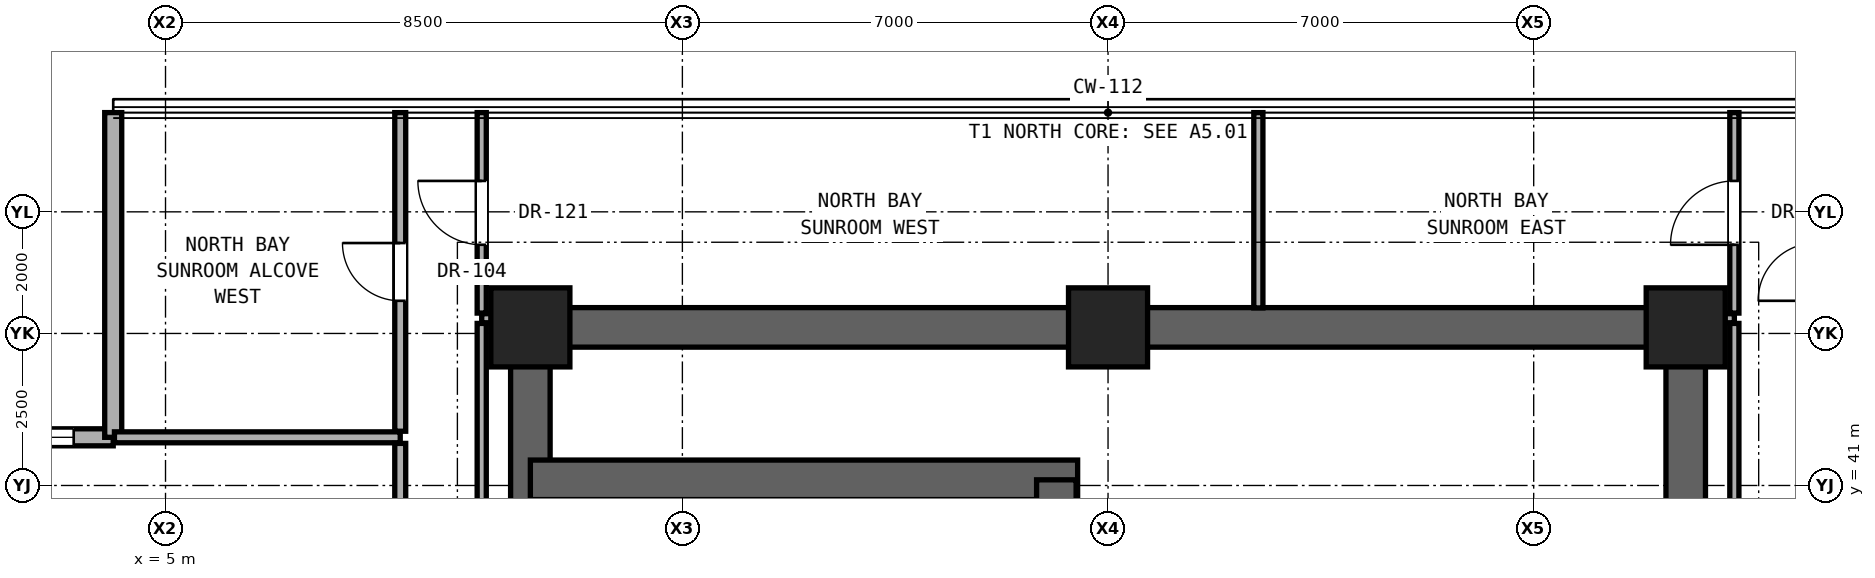
"""IFC4 building model, lengths in metres.
Left out: names, types, materials, properties, quantities, classifications, styles, units other than length and angle.
Written with IfcOpenShell. Run it as: python <this file> out.ifc"""

import sys

from ifc_helpers import new_model, si_unit, direction, frame, frame_2d, origin, origin_2d, place, context, subcontext, project, spatial, rectangle, extrude, element, fill, save


model = new_model("IFC4")
c1 = context("Model", 3, precision=1e-05, world=origin(), true_north=direction((0.0, 1.0)))
c2 = subcontext(c1, "Body", "Model", "MODEL_VIEW")
j1 = project(units=[si_unit("LENGTHUNIT", "METRE"), si_unit("PLANEANGLEUNIT", "RADIAN")], contexts=[c1])
p1 = place(None, origin())
s1 = spatial("IfcSite", under=j1, at=p1, CompositionType="ELEMENT")
p2 = place(p1, origin())
s2 = spatial("IfcBuilding", under=s1, at=p2, CompositionType="ELEMENT")
p3 = place(p2, frame((0.0, 0.0, 65.3)))
s3 = spatial("IfcBuildingStorey", under=s2, at=p3, CompositionType="ELEMENT", Elevation=65.3)
for number, where, z_axis, x_axis in (
    (1, (11.0, 43.6, 0.0), (0.0, 0.0, 1.0), (1.0, 0.0, 0.0)),
    (2, (20.5, 43.6, 0.0), (0.0, 0.0, 1.0), (1.0, 0.0, 0.0)),
    (3, (30.0, 43.6, 0.0), (0.0, 0.0, 1.0), (1.0, 0.0, 0.0)),
):
    element("IfcColumn", number, at=place(p3, frame(where, z_axis=z_axis, x_axis=x_axis)), inside=s3, PredefinedType="COLUMN", context=c2, shape_type="SweptSolid", body=[
        extrude(rectangle(XDim=1.3, YDim=1.3, at=origin_2d()), origin(), (0.0, 0.0, 1.0), 3.3),
    ])
p4 = place(p3, frame((11.0, 43.6, 0.0), z_axis=(0.0, 0.0, 1.0), x_axis=(1.0, 0.0, 0.0)))
e4 = element("IfcWall", 4, at=p4, inside=s3, PredefinedType="SHEAR", context=c2, shape_type="SweptSolid", body=[
    extrude(rectangle(XDim=19.0, YDim=0.65, at=frame_2d((9.5, 0.0))), origin(), (0.0, 0.0, 1.0), 3.06),
])
for number, where, z_axis, x_axis in (
    (5, (11.0, 37.6, 0.0), (0.0, 0.0, 1.0), (0.0, 1.0, 0.0)),
    (6, (30.0, 37.6, 0.0), (0.0, 0.0, 1.0), (0.0, 1.0, 0.0)),
):
    element("IfcWall", number, at=place(p3, frame(where, z_axis=z_axis, x_axis=x_axis)), inside=s3, PredefinedType="SHEAR", context=c2, shape_type="SweptSolid", body=[
        extrude(rectangle(XDim=6.0, YDim=0.65, at=frame_2d((3.0, 0.0))), origin(), (0.0, 0.0, 1.0), 3.06),
    ])
p5 = place(p3, frame((11.0, 41.093, 0.0), z_axis=(0.0, 0.0, 1.0), x_axis=(1.0, 0.0, 0.0)))
e7 = element("IfcWall", 7, at=p5, inside=s3, PredefinedType="SHEAR", context=c2, shape_type="SweptSolid", body=[
    extrude(rectangle(XDim=9.0, YDim=0.65, at=frame_2d((4.5, 0.0))), origin(), (0.0, 0.0, 1.0), 3.06),
])
p6 = place(p3, frame((19.65, 37.6, 0.0), z_axis=(0.0, 0.0, 1.0), x_axis=(0.0, 1.0, 0.0)))
e8 = element("IfcWall", 8, at=p6, inside=s3, PredefinedType="SHEAR", context=c2, shape_type="SweptSolid", body=[
    extrude(rectangle(XDim=3.493, YDim=0.65, at=frame_2d((1.747, 0.0))), origin(), (0.0, 0.0, 1.0), 3.06),
])
p7 = place(p3, frame((4.14, 41.792, 0.0), z_axis=(0.0, 0.0, 1.0), x_axis=(-1.0, 0.0, 0.0)))
e9 = element("IfcWall", 9, at=p7, inside=s3, PredefinedType="SOLIDWALL", context=c2, shape_type="SweptSolid", body=[
    extrude(rectangle(XDim=5.34, YDim=0.28, at=frame_2d((2.67, 0.0))), origin(), (0.0, 0.0, 1.0), 3.04),
])
p8 = place(p7, frame((0.65, 0.0, 0.85)))
e10 = element("IfcOpeningElement", 10, at=p8, cuts=e9, PredefinedType="OPENING", context=c2, shape_type="SweptSolid", body=[
    extrude(rectangle(XDim=1.1, YDim=2.0, at=frame_2d((0.55, 1.0))), frame((0.0, 0.15, 0.0), z_axis=(0.0, -1.0, 0.0), x_axis=(1.0, 0.0, 0.0)), (0.0, 0.0, 1.0), 0.3),
])
p9 = place(p3, frame((4.14, 47.132, 0.0), z_axis=(0.0, 0.0, 1.0), x_axis=(0.0, -1.0, 0.0)))
e11 = element("IfcWall", 11, at=p9, inside=s3, PredefinedType="SOLIDWALL", context=c2, shape_type="SweptSolid", body=[
    extrude(rectangle(XDim=5.34, YDim=0.28, at=frame_2d((2.67, 0.0))), origin(), (0.0, 0.0, 1.0), 3.04),
])
p10 = place(p3, frame((4.16, 41.792, 0.0), z_axis=(0.0, 0.0, 1.0), x_axis=(1.0, 0.0, 0.0)))
e12 = element("IfcWall", 12, at=p10, inside=s3, PredefinedType="PARTITIONING", context=c2, shape_type="SweptSolid", body=[
    extrude(rectangle(XDim=4.7, YDim=0.18, at=frame_2d((2.35, 0.0))), origin(), (0.0, 0.0, 1.0), 3.06),
])
for number, where, z_axis, x_axis in (
    (13, (10.2, 43.75, 0.0), (0.0, 0.0, 1.0), (1.0, 0.0, 0.0)),
    (14, (30.32, 43.75, 0.0), (0.0, 0.0, 1.0), (1.0, 0.0, 0.0)),
):
    element("IfcWall", number, at=place(p3, frame(where, z_axis=z_axis, x_axis=x_axis)), inside=s3, PredefinedType="PARTITIONING", context=c2, shape_type="SweptSolid", body=[
        extrude(rectangle(XDim=0.48, YDim=0.15, at=frame_2d((0.24, 0.0))), origin(), (0.0, 0.0, 1.0), 3.06),
    ])
p11 = place(p3, frame((8.86, 27.2, 0.0), z_axis=(0.0, 0.0, 1.0), x_axis=(0.0, 1.0, 0.0)))
e15 = element("IfcWall", 15, at=p11, inside=s3, PredefinedType="PARTITIONING", context=c2, shape_type="SweptSolid", body=[
    extrude(rectangle(XDim=14.492, YDim=0.18, at=frame_2d((7.246, 0.0))), origin(), (0.0, 0.0, 1.0), 2.279),
])
p12 = place(p11, frame((6.721, 0.0, 0.0)))
e16 = element("IfcOpeningElement", 16, at=p12, cuts=e15, PredefinedType="OPENING", context=c2, shape_type="SweptSolid", body=[
    extrude(rectangle(XDim=1.05, YDim=2.2, at=frame_2d((0.525, 1.1))), frame((0.0, 0.1, 0.0), z_axis=(0.0, -1.0, 0.0), x_axis=(1.0, 0.0, 0.0)), (0.0, 0.0, 1.0), 0.2),
])
p13 = place(p3, frame((8.86, 41.892, 0.0), z_axis=(0.0, 0.0, 1.0), x_axis=(0.0, 1.0, 0.0)))
e17 = element("IfcWall", 17, at=p13, inside=s3, PredefinedType="PARTITIONING", context=c2, shape_type="SweptSolid", body=[
    extrude(rectangle(XDim=5.24, YDim=0.18, at=frame_2d((2.62, 0.0))), origin(), (0.0, 0.0, 1.0), 3.06),
])
p14 = place(p13, frame((2.145, 0.0, 0.0)))
e18 = element("IfcOpeningElement", 18, at=p14, cuts=e17, PredefinedType="OPENING", context=c2, shape_type="SweptSolid", body=[
    extrude(rectangle(XDim=0.95, YDim=2.15, at=frame_2d((0.475, 1.075))), frame((0.0, 0.1, 0.0), z_axis=(0.0, -1.0, 0.0), x_axis=(1.0, 0.0, 0.0)), (0.0, 0.0, 1.0), 0.2),
])
p15 = place(p3, frame((10.2, 34.535, 0.0), z_axis=(0.0, 0.0, 1.0), x_axis=(0.0, 1.0, 0.0)))
e19 = element("IfcWall", 19, at=p15, inside=s3, PredefinedType="PARTITIONING", context=c2, shape_type="SweptSolid", body=[
    extrude(rectangle(XDim=9.13, YDim=0.15, at=frame_2d((4.565, 0.0))), origin(), (0.0, 0.0, 1.0), 2.436),
])
p16 = place(p3, frame((10.2, 43.835, 0.0), z_axis=(0.0, 0.0, 1.0), x_axis=(0.0, 1.0, 0.0)))
e20 = element("IfcWall", 20, at=p16, inside=s3, PredefinedType="PARTITIONING", context=c2, shape_type="SweptSolid", body=[
    extrude(rectangle(XDim=3.297, YDim=0.15, at=frame_2d((1.648, 0.0))), origin(), (0.0, 0.0, 1.0), 3.06),
])
p17 = place(p16, frame((1.124, 0.0, 0.0)))
e21 = element("IfcOpeningElement", 21, at=p17, cuts=e20, PredefinedType="OPENING", context=c2, shape_type="SweptSolid", body=[
    extrude(rectangle(XDim=1.05, YDim=2.2, at=frame_2d((0.525, 1.1))), frame((0.0, 0.085, 0.0), z_axis=(0.0, -1.0, 0.0), x_axis=(1.0, 0.0, 0.0)), (0.0, 0.0, 1.0), 0.17),
])
p18 = place(p3, frame((22.972, 43.92, 0.0), z_axis=(0.0, 0.0, 1.0), x_axis=(0.0, 1.0, 0.0)))
e22 = element("IfcWall", 22, at=p18, inside=s3, PredefinedType="PARTITIONING", context=c2, shape_type="SweptSolid", body=[
    extrude(rectangle(XDim=3.212, YDim=0.15, at=frame_2d((1.606, 0.0))), origin(), (0.0, 0.0, 1.0), 3.06),
])
p19 = place(p3, frame((30.8, 34.57, 0.0), z_axis=(0.0, 0.0, 1.0), x_axis=(0.0, 1.0, 0.0)))
e23 = element("IfcWall", 23, at=p19, inside=s3, PredefinedType="PARTITIONING", context=c2, shape_type="SweptSolid", body=[
    extrude(rectangle(XDim=9.095, YDim=0.15, at=frame_2d((4.547, 0.0))), origin(), (0.0, 0.0, 1.0), 2.436),
])
p20 = place(p3, frame((30.8, 43.835, 0.0), z_axis=(0.0, 0.0, 1.0), x_axis=(0.0, 1.0, 0.0)))
e24 = element("IfcWall", 24, at=p20, inside=s3, PredefinedType="PARTITIONING", context=c2, shape_type="SweptSolid", body=[
    extrude(rectangle(XDim=3.297, YDim=0.15, at=frame_2d((1.648, 0.0))), origin(), (0.0, 0.0, 1.0), 3.06),
])
p21 = place(p20, frame((1.124, 0.0, 0.0)))
e25 = element("IfcOpeningElement", 25, at=p21, cuts=e24, PredefinedType="OPENING", context=c2, shape_type="SweptSolid", body=[
    extrude(rectangle(XDim=1.05, YDim=2.2, at=frame_2d((0.525, 1.1))), frame((0.0, 0.085, 0.0), z_axis=(0.0, -1.0, 0.0), x_axis=(1.0, 0.0, 0.0)), (0.0, 0.0, 1.0), 0.17),
])
p22 = place(p8, origin())
e26 = element("IfcWindow", 26, at=p22, inside=s3, PartitioningType="SINGLE_PANEL", PredefinedType="WINDOW", context=c2, shape_type="SweptSolid", body=[
    extrude(rectangle(XDim=1.1, YDim=2.0, at=frame_2d((0.55, 1.0))), frame((0.0, 0.03, 0.0), z_axis=(0.0, -1.0, 0.0), x_axis=(1.0, 0.0, 0.0)), (0.0, 0.0, 1.0), 0.06),
])
fill(e10, e26)
p23 = place(p17, origin())
e27 = element("IfcDoor", 27, at=p23, inside=s3, OperationType="SINGLE_SWING_RIGHT", PredefinedType="DOOR", context=c2, shape_type="SweptSolid", body=[
    extrude(rectangle(XDim=1.05, YDim=2.2, at=frame_2d((0.525, 1.1))), frame((0.0, 0.025, 0.0), z_axis=(0.0, -1.0, 0.0), x_axis=(1.0, 0.0, 0.0)), (0.0, 0.0, 1.0), 0.05),
])
fill(e21, e27)
p24 = place(p21, origin())
e28 = element("IfcDoor", 28, at=p24, inside=s3, OperationType="SINGLE_SWING_LEFT", PredefinedType="DOOR", context=c2, shape_type="SweptSolid", body=[
    extrude(rectangle(XDim=1.05, YDim=2.2, at=frame_2d((0.525, 1.1))), frame((0.0, 0.025, 0.0), z_axis=(0.0, -1.0, 0.0), x_axis=(1.0, 0.0, 0.0)), (0.0, 0.0, 1.0), 0.05),
])
fill(e25, e28)
p25 = place(p14, origin())
e29 = element("IfcDoor", 29, at=p25, inside=s3, OperationType="SINGLE_SWING_RIGHT", PredefinedType="DOOR", context=c2, shape_type="SweptSolid", body=[
    extrude(rectangle(XDim=0.95, YDim=2.15, at=frame_2d((0.475, 1.075))), frame((0.0, 0.025, 0.0), z_axis=(0.0, -1.0, 0.0), x_axis=(1.0, 0.0, 0.0)), (0.0, 0.0, 1.0), 0.05),
])
fill(e18, e29)
save(model, sys.argv[1])
